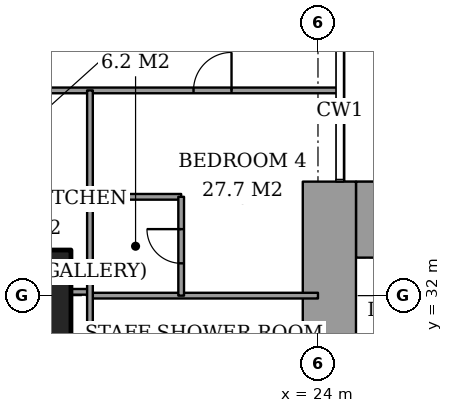
"""IFC4 building model, lengths in metres.
Left out: names, types, materials, properties, quantities, classifications, styles, units other than length and angle.
Written with IfcOpenShell. Run it as: python <this file> out.ifc"""

import sys

from ifc_helpers import new_model, si_unit, direction, frame, frame_2d, origin, origin_2d, place, context, subcontext, project, spatial, rectangle, extrude, element, fill, save


model = new_model("IFC4")
c1 = context("Model", 3, precision=1e-05, world=origin(), true_north=direction((0.0, 1.0)))
c2 = subcontext(c1, "Body", "Model", "MODEL_VIEW")
j1 = project(units=[si_unit("LENGTHUNIT", "METRE"), si_unit("PLANEANGLEUNIT", "RADIAN")], contexts=[c1])
p1 = place(None, origin())
s1 = spatial("IfcSite", under=j1, at=p1, CompositionType="ELEMENT")
p2 = place(p1, origin())
s2 = spatial("IfcBuilding", under=s1, at=p2, CompositionType="ELEMENT")
p3 = place(p2, frame((0.0, 0.0, 189.4)))
s3 = spatial("IfcBuildingStorey", under=s2, at=p3, CompositionType="ELEMENT", Elevation=189.4)
p4 = place(p3, frame((16.0, 32.0, 0.0), z_axis=(0.0, 0.0, 1.0), x_axis=(1.0, 0.0, 0.0)))
e1 = element("IfcColumn", 1, at=p4, inside=s3, PredefinedType="COLUMN", context=c2, shape_type="SweptSolid", body=[
    extrude(rectangle(XDim=3.0, YDim=2.4, at=origin_2d()), origin(), (0.0, 0.0, 1.0), 3.6),
])
p5 = place(p3, frame((25.0, 34.0, 0.0), z_axis=(0.0, 0.0, 1.0), x_axis=(1.0, 0.0, 0.0)))
e2 = element("IfcWall", 2, at=p5, inside=s3, PredefinedType="SHEAR", context=c2, shape_type="SweptSolid", body=[
    extrude(rectangle(XDim=3.15, YDim=2.0, at=frame_2d((1.575, 0.0))), origin(), (0.0, 0.0, 1.0), 3.6),
])
p6 = place(p3, frame((24.3, 23.15, 0.0), z_axis=(0.0, 0.0, 1.0), x_axis=(0.0, 1.0, 0.0)))
e3 = element("IfcWall", 3, at=p6, inside=s3, PredefinedType="SHEAR", context=c2, shape_type="SweptSolid", body=[
    extrude(rectangle(XDim=11.85, YDim=1.4, at=frame_2d((5.925, 0.0))), origin(), (0.0, 0.0, 1.0), 3.6),
])
p7 = place(p6, frame((0.75, 0.0, 0.0)))
e4 = element("IfcOpeningElement", 4, at=p7, cuts=e3, PredefinedType="OPENING", context=c2, shape_type="SweptSolid", body=[
    extrude(rectangle(XDim=1.8, YDim=2.4, at=frame_2d((0.9, 1.2))), frame((0.0, 0.71, 0.0), z_axis=(0.0, -1.0, 0.0), x_axis=(1.0, 0.0, 0.0)), (0.0, 0.0, 1.0), 1.42),
])
p8 = place(p3, frame((18.0, 32.0, 0.0), z_axis=(0.0, 0.0, 1.0), x_axis=(1.0, 0.0, 0.0)))
e5 = element("IfcWall", 5, at=p8, inside=s3, PredefinedType="PARTITIONING", context=c2, shape_type="SweptSolid", body=[
    extrude(rectangle(XDim=6.0, YDim=0.15, at=frame_2d((3.0, 0.0))), origin(), (0.0, 0.0, 1.0), 2.634),
])
p9 = place(p3, frame((17.5, 32.1, 0.0), z_axis=(0.0, 0.0, 1.0), x_axis=(1.0, 0.0, 0.0)))
e6 = element("IfcWall", 6, at=p9, inside=s3, PredefinedType="PARTITIONING", context=c2, shape_type="SweptSolid", body=[
    extrude(rectangle(XDim=0.5, YDim=0.15, at=frame_2d((0.25, 0.0))), origin(), (0.0, 0.0, 1.0), 2.634),
])
p10 = place(p3, frame((18.0, 34.6, 0.0), z_axis=(0.0, 0.0, 1.0), x_axis=(1.0, 0.0, 0.0)))
e7 = element("IfcWall", 7, at=p10, inside=s3, PredefinedType="PARTITIONING", context=c2, shape_type="SweptSolid", body=[
    extrude(rectangle(XDim=2.4, YDim=0.15, at=frame_2d((1.2, 0.0))), origin(), (0.0, 0.0, 1.0), 3.35),
])
p11 = place(p3, frame((-0.45, 37.4, 0.0), z_axis=(0.0, 0.0, 1.0), x_axis=(1.0, 0.0, 0.0)))
e8 = element("IfcWall", 8, at=p11, inside=s3, PredefinedType="PARTITIONING", context=c2, shape_type="SweptSolid", body=[
    extrude(rectangle(XDim=25.011, YDim=0.15, at=frame_2d((12.505, 0.0))), origin(), (0.0, 0.0, 1.0), 3.35),
])
p12 = place(p11, frame((13.25, 0.0, 0.0)))
e9 = element("IfcOpeningElement", 9, at=p12, cuts=e8, PredefinedType="OPENING", context=c2, shape_type="SweptSolid", body=[
    extrude(rectangle(XDim=1.0, YDim=2.1, at=frame_2d((0.5, 1.05))), frame((0.0, 0.085, 0.0), z_axis=(0.0, -1.0, 0.0), x_axis=(1.0, 0.0, 0.0)), (0.0, 0.0, 1.0), 0.17),
])
p13 = place(p11, frame((3.087, 0.0, 0.0)))
e10 = element("IfcOpeningElement", 10, at=p13, cuts=e8, PredefinedType="OPENING", context=c2, shape_type="SweptSolid", body=[
    extrude(rectangle(XDim=1.0, YDim=2.1, at=frame_2d((0.5, 1.05))), frame((0.0, 0.085, 0.0), z_axis=(0.0, -1.0, 0.0), x_axis=(1.0, 0.0, 0.0)), (0.0, 0.0, 1.0), 0.17),
])
p14 = place(p11, frame((8.363, 0.0, 0.0)))
e11 = element("IfcOpeningElement", 11, at=p14, cuts=e8, PredefinedType="OPENING", context=c2, shape_type="SweptSolid", body=[
    extrude(rectangle(XDim=0.9, YDim=2.1, at=frame_2d((0.45, 1.05))), frame((0.0, 0.085, 0.0), z_axis=(0.0, -1.0, 0.0), x_axis=(1.0, 0.0, 0.0)), (0.0, 0.0, 1.0), 0.17),
])
p15 = place(p11, frame((11.05, 0.0, 0.0)))
e12 = element("IfcOpeningElement", 12, at=p15, cuts=e8, PredefinedType="OPENING", context=c2, shape_type="SweptSolid", body=[
    extrude(rectangle(XDim=1.0, YDim=2.1, at=frame_2d((0.5, 1.05))), frame((0.0, 0.085, 0.0), z_axis=(0.0, -1.0, 0.0), x_axis=(1.0, 0.0, 0.0)), (0.0, 0.0, 1.0), 0.17),
])
p16 = place(p11, frame((16.15, 0.0, 0.0)))
e13 = element("IfcOpeningElement", 13, at=p16, cuts=e8, PredefinedType="OPENING", context=c2, shape_type="SweptSolid", body=[
    extrude(rectangle(XDim=1.0, YDim=2.1, at=frame_2d((0.5, 1.05))), frame((0.0, 0.085, 0.0), z_axis=(0.0, -1.0, 0.0), x_axis=(1.0, 0.0, 0.0)), (0.0, 0.0, 1.0), 0.17),
])
p17 = place(p11, frame((21.175, 0.0, 0.0)))
e14 = element("IfcOpeningElement", 14, at=p17, cuts=e8, PredefinedType="OPENING", context=c2, shape_type="SweptSolid", body=[
    extrude(rectangle(XDim=1.0, YDim=2.1, at=frame_2d((0.5, 1.05))), frame((0.0, 0.085, 0.0), z_axis=(0.0, -1.0, 0.0), x_axis=(1.0, 0.0, 0.0)), (0.0, 0.0, 1.0), 0.17),
])
p18 = place(p3, frame((18.0, 28.0, 0.0), z_axis=(0.0, 0.0, 1.0), x_axis=(0.0, 1.0, 0.0)))
e15 = element("IfcWall", 15, at=p18, inside=s3, PredefinedType="PARTITIONING", context=c2, shape_type="SweptSolid", body=[
    extrude(rectangle(XDim=9.4, YDim=0.15, at=frame_2d((4.7, 0.0))), origin(), (0.0, 0.0, 1.0), 3.35),
])
p19 = place(p18, frame((0.55, 0.0, 0.0)))
e16 = element("IfcOpeningElement", 16, at=p19, cuts=e15, PredefinedType="OPENING", context=c2, shape_type="SweptSolid", body=[
    extrude(rectangle(XDim=0.9, YDim=2.1, at=frame_2d((0.45, 1.05))), frame((0.0, 0.085, 0.0), z_axis=(0.0, -1.0, 0.0), x_axis=(1.0, 0.0, 0.0)), (0.0, 0.0, 1.0), 0.17),
])
p20 = place(p3, frame((20.4, 32.0, 0.0), z_axis=(0.0, 0.0, 1.0), x_axis=(0.0, 1.0, 0.0)))
e17 = element("IfcWall", 17, at=p20, inside=s3, PredefinedType="PARTITIONING", context=c2, shape_type="SweptSolid", body=[
    extrude(rectangle(XDim=2.6, YDim=0.15, at=frame_2d((1.3, 0.0))), origin(), (0.0, 0.0, 1.0), 3.35),
])
p21 = place(p20, frame((0.85, 0.0, 0.0)))
e18 = element("IfcOpeningElement", 18, at=p21, cuts=e17, PredefinedType="OPENING", context=c2, shape_type="SweptSolid", body=[
    extrude(rectangle(XDim=0.9, YDim=2.1, at=frame_2d((0.45, 1.05))), frame((0.0, 0.085, 0.0), z_axis=(0.0, -1.0, 0.0), x_axis=(1.0, 0.0, 0.0)), (0.0, 0.0, 1.0), 0.17),
])
p22 = place(p21, origin())
e19 = element("IfcDoor", 19, at=p22, inside=s3, OperationType="SINGLE_SWING_LEFT", PredefinedType="DOOR", context=c2, shape_type="SweptSolid", body=[
    extrude(rectangle(XDim=0.9, YDim=2.1, at=frame_2d((0.45, 1.05))), frame((0.0, 0.025, 0.0), z_axis=(0.0, -1.0, 0.0), x_axis=(1.0, 0.0, 0.0)), (0.0, 0.0, 1.0), 0.05),
])
fill(e18, e19)
p23 = place(p17, origin())
e20 = element("IfcDoor", 20, at=p23, inside=s3, OperationType="SINGLE_SWING_LEFT", PredefinedType="DOOR", context=c2, shape_type="SweptSolid", body=[
    extrude(rectangle(XDim=1.0, YDim=2.1, at=frame_2d((0.5, 1.05))), frame((0.0, 0.025, 0.0), z_axis=(0.0, -1.0, 0.0), x_axis=(1.0, 0.0, 0.0)), (0.0, 0.0, 1.0), 0.05),
])
fill(e14, e20)
save(model, sys.argv[1])
